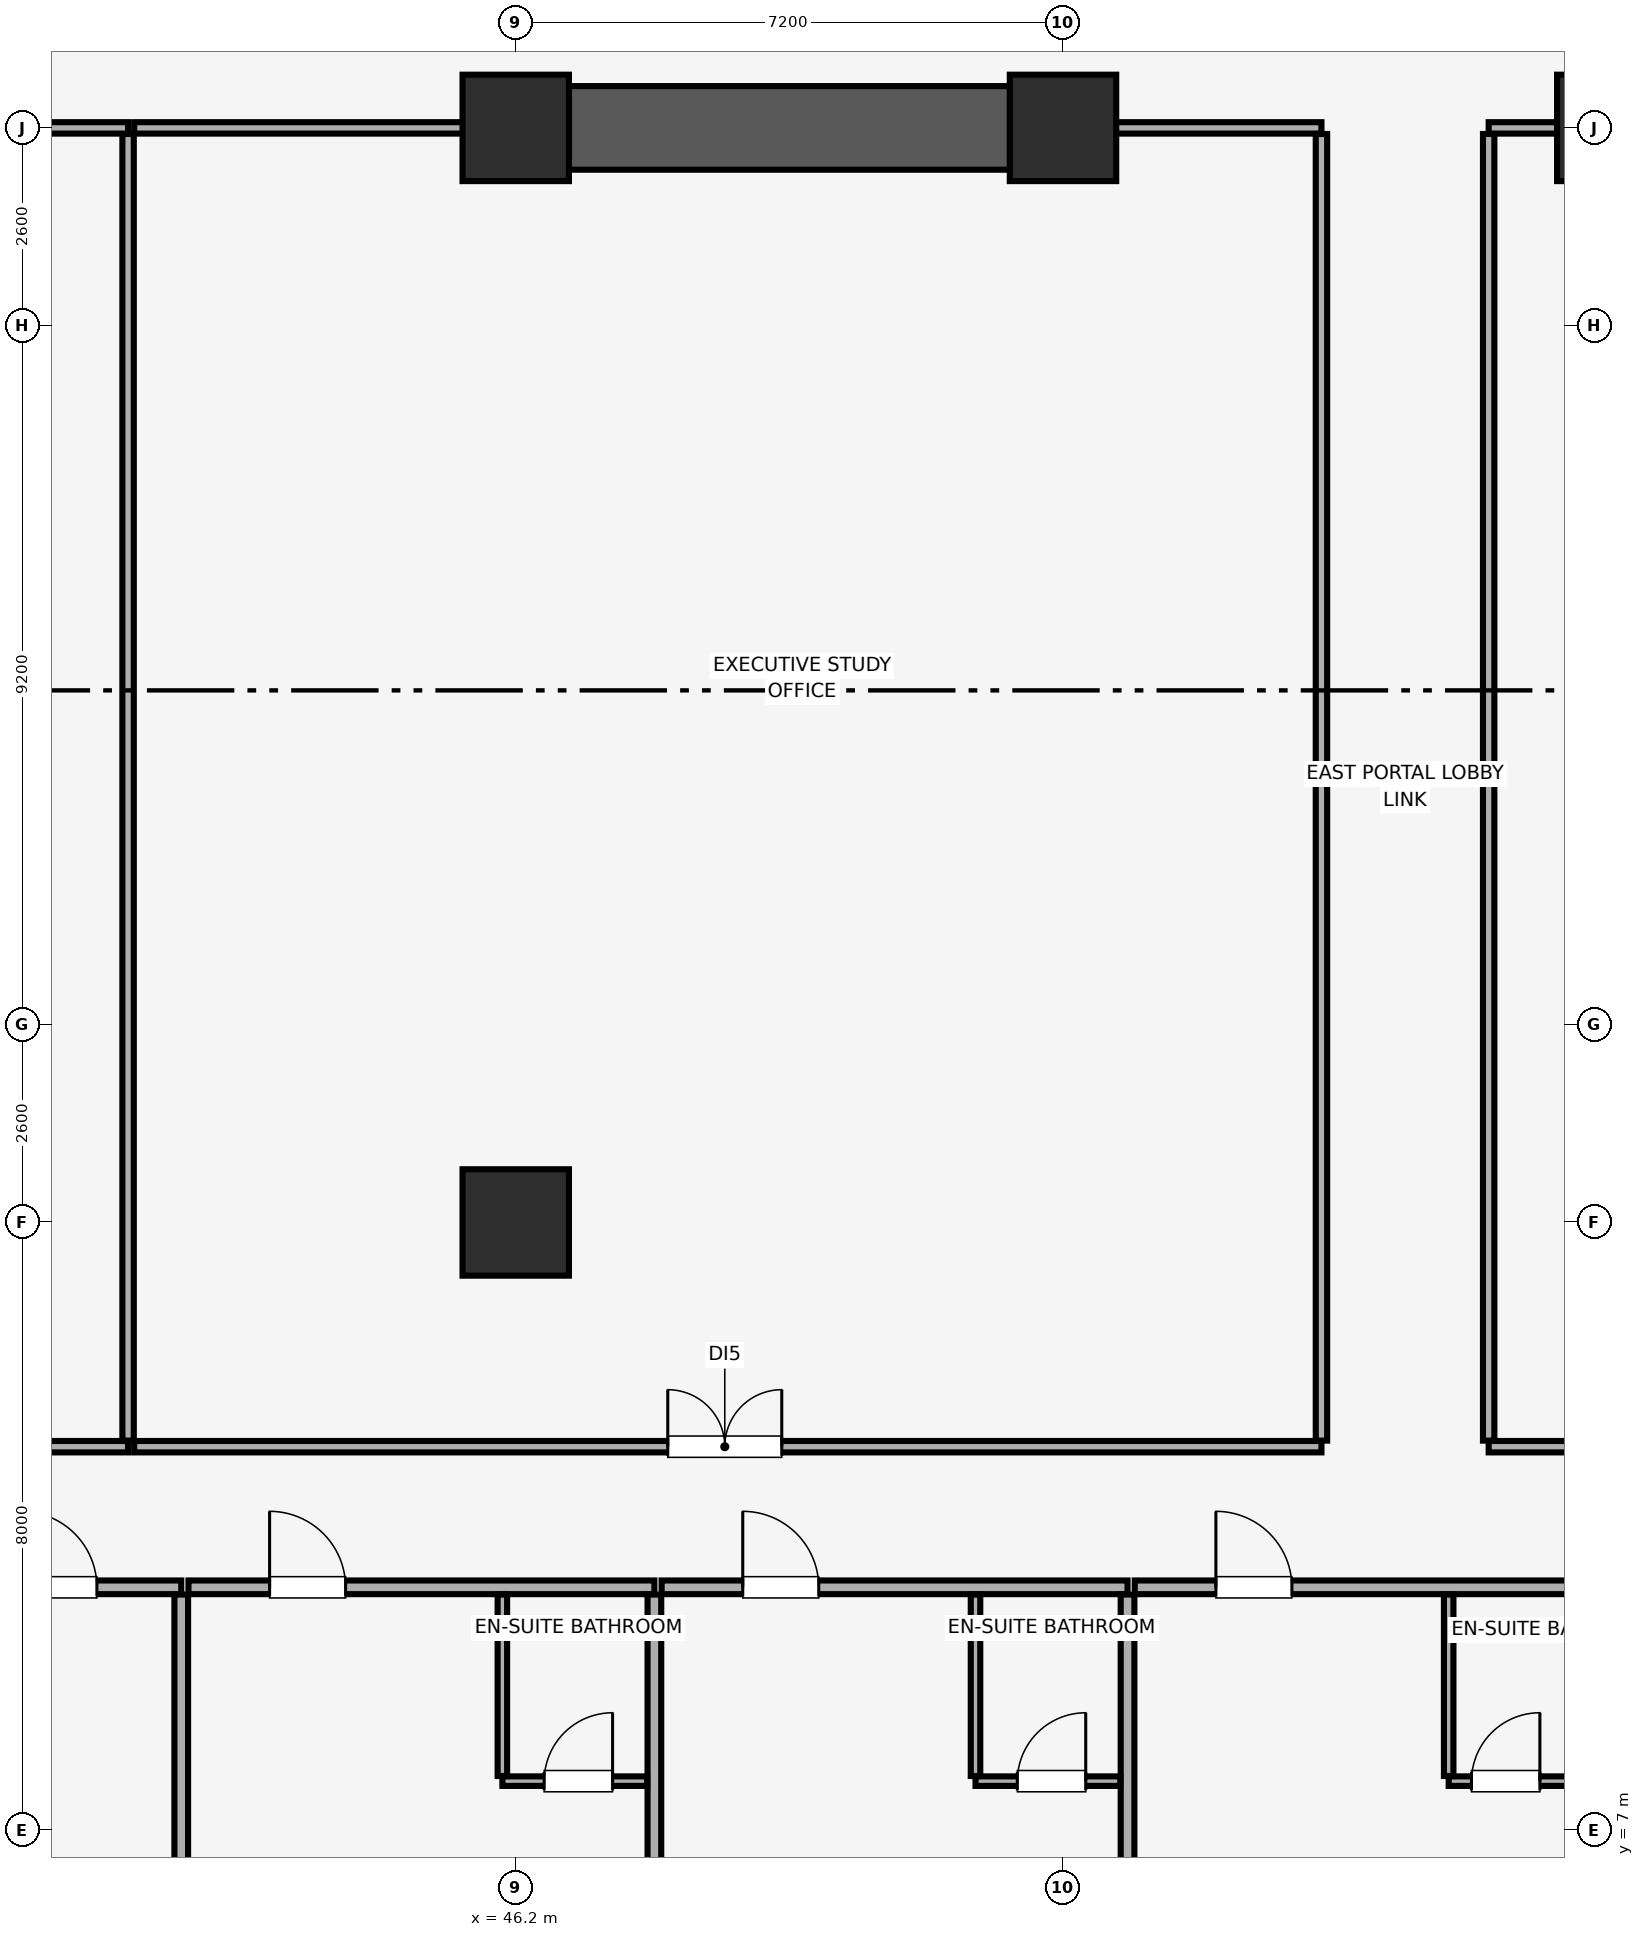
"""IFC4 building model, lengths in metres.
Left out: names, types, materials, properties, quantities, classifications, styles, units other than length and angle.
Written with IfcOpenShell. Run it as: python <this file> out.ifc"""

import sys

from ifc_helpers import new_model, si_unit, direction, frame, frame_2d, origin, origin_2d, place, context, subcontext, project, spatial, rectangle, extrude, element, fill, save


model = new_model("IFC4")
c1 = context("Model", 3, precision=1e-05, world=origin(), true_north=direction((0.0, 1.0)))
c2 = subcontext(c1, "Body", "Model", "MODEL_VIEW")
j1 = project(units=[si_unit("LENGTHUNIT", "METRE"), si_unit("PLANEANGLEUNIT", "RADIAN")], contexts=[c1])
p1 = place(None, origin())
s1 = spatial("IfcSite", under=j1, at=p1, CompositionType="ELEMENT")
p2 = place(p1, origin())
s2 = spatial("IfcBuilding", under=s1, at=p2, CompositionType="ELEMENT")
p3 = place(p2, frame((0.0, 0.0, 46.4)))
s3 = spatial("IfcBuildingStorey", under=s2, at=p3, CompositionType="ELEMENT", Elevation=46.4)
for number, where, z_axis, x_axis in (
    (1, (46.2, 15.0, 0.0), (0.0, 0.0, 1.0), (1.0, 0.0, 0.0)),
    (2, (46.2, 29.4, 0.0), (0.0, 0.0, 1.0), (1.0, 0.0, 0.0)),
    (3, (53.4, 29.4, 0.0), (0.0, 0.0, 1.0), (1.0, 0.0, 0.0)),
    (4, (60.6, 29.4, 0.0), (0.0, 0.0, 1.0), (1.0, 0.0, 0.0)),
):
    element("IfcColumn", number, at=place(p3, frame(where, z_axis=z_axis, x_axis=x_axis)), inside=s3, PredefinedType="COLUMN", context=c2, shape_type="SweptSolid", body=[
        extrude(rectangle(XDim=1.4, YDim=1.4, at=origin_2d()), origin(), (0.0, 0.0, 1.0), 3.51),
    ])
p4 = place(p3, frame((46.0, 29.4, 0.0), z_axis=(0.0, 0.0, 1.0), x_axis=(1.0, 0.0, 0.0)))
e5 = element("IfcWall", 5, at=p4, inside=s3, PredefinedType="SHEAR", context=c2, shape_type="SweptSolid", body=[
    extrude(rectangle(XDim=7.6, YDim=1.1, at=frame_2d((3.8, 0.0))), origin(), (0.0, 0.0, 1.0), 3.51),
])
p5 = place(p3, frame((35.669, 10.2, 0.0), z_axis=(0.0, 0.0, 1.0), x_axis=(1.0, 0.0, 0.0)))
e6 = element("IfcWall", 6, at=p5, inside=s3, PredefinedType="PARTITIONING", context=c2, shape_type="SweptSolid", body=[
    extrude(rectangle(XDim=6.13, YDim=0.18, at=frame_2d((3.065, 0.0))), origin(), (0.0, 0.0, 1.0), 3.51),
])
p6 = place(p5, frame((4.02, 0.0, 0.0)))
e7 = element("IfcOpeningElement", 7, at=p6, cuts=e6, PredefinedType="OPENING", context=c2, shape_type="SweptSolid", body=[
    extrude(rectangle(XDim=1.0, YDim=2.15, at=frame_2d((0.5, 1.075))), frame((0.0, 0.1, 0.0), z_axis=(0.0, -1.0, 0.0), x_axis=(1.0, 0.0, 0.0)), (0.0, 0.0, 1.0), 0.2),
])
p7 = place(p3, frame((41.799, 0.15, 0.0), z_axis=(0.0, 0.0, 1.0), x_axis=(0.0, 1.0, 0.0)))
e8 = element("IfcWall", 8, at=p7, inside=s3, PredefinedType="PARTITIONING", context=c2, shape_type="SweptSolid", body=[
    extrude(rectangle(XDim=9.955, YDim=0.18, at=frame_2d((4.978, 0.0))), origin(), (0.0, 0.0, 1.0), 2.898),
])
p8 = place(p3, frame((41.894, 10.2, 0.0), z_axis=(0.0, 0.0, 1.0), x_axis=(1.0, 0.0, 0.0)))
e9 = element("IfcWall", 9, at=p8, inside=s3, PredefinedType="PARTITIONING", context=c2, shape_type="SweptSolid", body=[
    extrude(rectangle(XDim=6.13, YDim=0.18, at=frame_2d((3.065, 0.0))), origin(), (0.0, 0.0, 1.0), 3.51),
])
p9 = place(p8, frame((1.067, 0.0, 0.0)))
e10 = element("IfcOpeningElement", 10, at=p9, cuts=e9, PredefinedType="OPENING", context=c2, shape_type="SweptSolid", body=[
    extrude(rectangle(XDim=1.0, YDim=2.15, at=frame_2d((0.5, 1.075))), frame((0.0, 0.1, 0.0), z_axis=(0.0, -1.0, 0.0), x_axis=(1.0, 0.0, 0.0)), (0.0, 0.0, 1.0), 0.2),
])
p10 = place(p3, frame((48.024, 0.15, 0.0), z_axis=(0.0, 0.0, 1.0), x_axis=(0.0, 1.0, 0.0)))
e11 = element("IfcWall", 11, at=p10, inside=s3, PredefinedType="PARTITIONING", context=c2, shape_type="SweptSolid", body=[
    extrude(rectangle(XDim=9.955, YDim=0.18, at=frame_2d((4.978, 0.0))), origin(), (0.0, 0.0, 1.0), 3.51),
])
p11 = place(p3, frame((46.024, 7.65, 0.0), z_axis=(0.0, 0.0, 1.0), x_axis=(1.0, 0.0, 0.0)))
e12 = element("IfcWall", 12, at=p11, inside=s3, PredefinedType="PARTITIONING", context=c2, shape_type="SweptSolid", body=[
    extrude(rectangle(XDim=1.905, YDim=0.125, at=frame_2d((0.953, 0.0))), origin(), (0.0, 0.0, 1.0), 3.51),
])
p12 = place(p11, frame((0.55, 0.0, 0.0)))
e13 = element("IfcOpeningElement", 13, at=p12, cuts=e12, PredefinedType="OPENING", context=c2, shape_type="SweptSolid", body=[
    extrude(rectangle(XDim=0.9, YDim=2.1, at=frame_2d((0.45, 1.05))), frame((0.0, 0.073, 0.0), z_axis=(0.0, -1.0, 0.0), x_axis=(1.0, 0.0, 0.0)), (0.0, 0.0, 1.0), 0.145),
])
p13 = place(p3, frame((46.024, 7.718, 0.0), z_axis=(0.0, 0.0, 1.0), x_axis=(0.0, 1.0, 0.0)))
e14 = element("IfcWall", 14, at=p13, inside=s3, PredefinedType="PARTITIONING", context=c2, shape_type="SweptSolid", body=[
    extrude(rectangle(XDim=2.387, YDim=0.125, at=frame_2d((1.194, 0.0))), origin(), (0.0, 0.0, 1.0), 2.898),
])
p14 = place(p3, frame((48.119, 10.2, 0.0), z_axis=(0.0, 0.0, 1.0), x_axis=(1.0, 0.0, 0.0)))
e15 = element("IfcWall", 15, at=p14, inside=s3, PredefinedType="PARTITIONING", context=c2, shape_type="SweptSolid", body=[
    extrude(rectangle(XDim=6.13, YDim=0.18, at=frame_2d((3.065, 0.0))), origin(), (0.0, 0.0, 1.0), 3.51),
])
p15 = place(p14, frame((1.067, 0.0, 0.0)))
e16 = element("IfcOpeningElement", 16, at=p15, cuts=e15, PredefinedType="OPENING", context=c2, shape_type="SweptSolid", body=[
    extrude(rectangle(XDim=1.0, YDim=2.15, at=frame_2d((0.5, 1.075))), frame((0.0, 0.1, 0.0), z_axis=(0.0, -1.0, 0.0), x_axis=(1.0, 0.0, 0.0)), (0.0, 0.0, 1.0), 0.2),
])
p16 = place(p3, frame((54.249, 0.15, 0.0), z_axis=(0.0, 0.0, 1.0), x_axis=(0.0, 1.0, 0.0)))
e17 = element("IfcWall", 17, at=p16, inside=s3, PredefinedType="PARTITIONING", context=c2, shape_type="SweptSolid", body=[
    extrude(rectangle(XDim=9.955, YDim=0.18, at=frame_2d((4.978, 0.0))), origin(), (0.0, 0.0, 1.0), 3.51),
])
p17 = place(p3, frame((52.249, 7.65, 0.0), z_axis=(0.0, 0.0, 1.0), x_axis=(1.0, 0.0, 0.0)))
e18 = element("IfcWall", 18, at=p17, inside=s3, PredefinedType="PARTITIONING", context=c2, shape_type="SweptSolid", body=[
    extrude(rectangle(XDim=1.905, YDim=0.125, at=frame_2d((0.953, 0.0))), origin(), (0.0, 0.0, 1.0), 3.51),
])
p18 = place(p17, frame((0.55, 0.0, 0.0)))
e19 = element("IfcOpeningElement", 19, at=p18, cuts=e18, PredefinedType="OPENING", context=c2, shape_type="SweptSolid", body=[
    extrude(rectangle(XDim=0.9, YDim=2.1, at=frame_2d((0.45, 1.05))), frame((0.0, 0.073, 0.0), z_axis=(0.0, -1.0, 0.0), x_axis=(1.0, 0.0, 0.0)), (0.0, 0.0, 1.0), 0.145),
])
p19 = place(p3, frame((52.249, 7.718, 0.0), z_axis=(0.0, 0.0, 1.0), x_axis=(0.0, 1.0, 0.0)))
e20 = element("IfcWall", 20, at=p19, inside=s3, PredefinedType="PARTITIONING", context=c2, shape_type="SweptSolid", body=[
    extrude(rectangle(XDim=2.387, YDim=0.125, at=frame_2d((1.194, 0.0))), origin(), (0.0, 0.0, 1.0), 3.51),
])
p20 = place(p3, frame((54.344, 10.2, 0.0), z_axis=(0.0, 0.0, 1.0), x_axis=(1.0, 0.0, 0.0)))
e21 = element("IfcWall", 21, at=p20, inside=s3, PredefinedType="PARTITIONING", context=c2, shape_type="SweptSolid", body=[
    extrude(rectangle(XDim=6.13, YDim=0.18, at=frame_2d((3.065, 0.0))), origin(), (0.0, 0.0, 1.0), 3.51),
])
p21 = place(p20, frame((1.067, 0.0, 0.0)))
e22 = element("IfcOpeningElement", 22, at=p21, cuts=e21, PredefinedType="OPENING", context=c2, shape_type="SweptSolid", body=[
    extrude(rectangle(XDim=1.0, YDim=2.15, at=frame_2d((0.5, 1.075))), frame((0.0, 0.1, 0.0), z_axis=(0.0, -1.0, 0.0), x_axis=(1.0, 0.0, 0.0)), (0.0, 0.0, 1.0), 0.2),
])
p22 = place(p3, frame((58.474, 7.65, 0.0), z_axis=(0.0, 0.0, 1.0), x_axis=(1.0, 0.0, 0.0)))
e23 = element("IfcWall", 23, at=p22, inside=s3, PredefinedType="PARTITIONING", context=c2, shape_type="SweptSolid", body=[
    extrude(rectangle(XDim=1.905, YDim=0.125, at=frame_2d((0.953, 0.0))), origin(), (0.0, 0.0, 1.0), 3.51),
])
p23 = place(p22, frame((0.3, 0.0, 0.0)))
e24 = element("IfcOpeningElement", 24, at=p23, cuts=e23, PredefinedType="OPENING", context=c2, shape_type="SweptSolid", body=[
    extrude(rectangle(XDim=0.9, YDim=2.1, at=frame_2d((0.45, 1.05))), frame((0.0, 0.073, 0.0), z_axis=(0.0, -1.0, 0.0), x_axis=(1.0, 0.0, 0.0)), (0.0, 0.0, 1.0), 0.145),
])
p24 = place(p3, frame((58.474, 7.718, 0.0), z_axis=(0.0, 0.0, 1.0), x_axis=(0.0, 1.0, 0.0)))
e25 = element("IfcWall", 25, at=p24, inside=s3, PredefinedType="PARTITIONING", context=c2, shape_type="SweptSolid", body=[
    extrude(rectangle(XDim=2.387, YDim=0.125, at=frame_2d((1.194, 0.0))), origin(), (0.0, 0.0, 1.0), 3.51),
])
p25 = place(p3, frame((27.2, 12.05, 0.0), z_axis=(0.0, 0.0, 1.0), x_axis=(1.0, 0.0, 0.0)))
e26 = element("IfcWall", 26, at=p25, inside=s3, PredefinedType="PARTITIONING", context=c2, shape_type="SweptSolid", body=[
    extrude(rectangle(XDim=13.9, YDim=0.15, at=frame_2d((6.95, 0.0))), origin(), (0.0, 0.0, 1.0), 3.51),
])
p26 = place(p25, frame((6.2, 0.0, 0.0)))
e27 = element("IfcOpeningElement", 27, at=p26, cuts=e26, PredefinedType="OPENING", context=c2, shape_type="SweptSolid", body=[
    extrude(rectangle(XDim=1.5, YDim=2.25, at=frame_2d((0.75, 1.125))), frame((0.0, 0.085, 0.0), z_axis=(0.0, -1.0, 0.0), x_axis=(1.0, 0.0, 0.0)), (0.0, 0.0, 1.0), 0.17),
])
p27 = place(p3, frame((38.01, 29.4, 0.0), z_axis=(0.0, 0.0, 1.0), x_axis=(1.0, 0.0, 0.0)))
e28 = element("IfcWall", 28, at=p27, inside=s3, PredefinedType="PARTITIONING", context=c2, shape_type="SweptSolid", body=[
    extrude(rectangle(XDim=3.09, YDim=0.15, at=frame_2d((1.545, 0.0))), origin(), (0.0, 0.0, 1.0), 2.41),
])
p28 = place(p3, frame((41.1, 12.13, 0.0), z_axis=(0.0, 0.0, 1.0), x_axis=(0.0, 1.0, 0.0)))
e29 = element("IfcWall", 29, at=p28, inside=s3, PredefinedType="PARTITIONING", context=c2, shape_type="SweptSolid", body=[
    extrude(rectangle(XDim=17.19, YDim=0.15, at=frame_2d((8.595, 0.0))), origin(), (0.0, 0.0, 1.0), 3.51),
])
p29 = place(p3, frame((41.18, 12.05, 0.0), z_axis=(0.0, 0.0, 1.0), x_axis=(1.0, 0.0, 0.0)))
e30 = element("IfcWall", 30, at=p29, inside=s3, PredefinedType="PARTITIONING", context=c2, shape_type="SweptSolid", body=[
    extrude(rectangle(XDim=15.62, YDim=0.15, at=frame_2d((7.81, 0.0))), origin(), (0.0, 0.0, 1.0), 3.51),
])
p30 = place(p29, frame((7.02, 0.0, 0.0)))
e31 = element("IfcOpeningElement", 31, at=p30, cuts=e30, PredefinedType="OPENING", context=c2, shape_type="SweptSolid", body=[
    extrude(rectangle(XDim=1.5, YDim=2.25, at=frame_2d((0.75, 1.125))), frame((0.0, 0.085, 0.0), z_axis=(0.0, -1.0, 0.0), x_axis=(1.0, 0.0, 0.0)), (0.0, 0.0, 1.0), 0.17),
])
p31 = place(p3, frame((41.18, 29.4, 0.0), z_axis=(0.0, 0.0, 1.0), x_axis=(1.0, 0.0, 0.0)))
e32 = element("IfcWall", 32, at=p31, inside=s3, PredefinedType="PARTITIONING", context=c2, shape_type="SweptSolid", body=[
    extrude(rectangle(XDim=4.81, YDim=0.15, at=frame_2d((2.405, 0.0))), origin(), (0.0, 0.0, 1.0), 2.41),
])
p32 = place(p3, frame((53.61, 29.4, 0.0), z_axis=(0.0, 0.0, 1.0), x_axis=(1.0, 0.0, 0.0)))
e33 = element("IfcWall", 33, at=p32, inside=s3, PredefinedType="PARTITIONING", context=c2, shape_type="SweptSolid", body=[
    extrude(rectangle(XDim=3.19, YDim=0.15, at=frame_2d((1.595, 0.0))), origin(), (0.0, 0.0, 1.0), 2.41),
])
p33 = place(p3, frame((56.8, 12.13, 0.0), z_axis=(0.0, 0.0, 1.0), x_axis=(0.0, 1.0, 0.0)))
e34 = element("IfcWall", 34, at=p33, inside=s3, PredefinedType="PARTITIONING", context=c2, shape_type="SweptSolid", body=[
    extrude(rectangle(XDim=17.19, YDim=0.15, at=frame_2d((8.595, 0.0))), origin(), (0.0, 0.0, 1.0), 2.898),
])
p34 = place(p3, frame((59.0, 12.05, 0.0), z_axis=(0.0, 0.0, 1.0), x_axis=(1.0, 0.0, 0.0)))
e35 = element("IfcWall", 35, at=p34, inside=s3, PredefinedType="PARTITIONING", context=c2, shape_type="SweptSolid", body=[
    extrude(rectangle(XDim=9.2, YDim=0.15, at=frame_2d((4.6, 0.0))), origin(), (0.0, 0.0, 1.0), 3.51),
])
p35 = place(p34, frame((4.1, 0.0, 0.0)))
e36 = element("IfcOpeningElement", 36, at=p35, cuts=e35, PredefinedType="OPENING", context=c2, shape_type="SweptSolid", body=[
    extrude(rectangle(XDim=1.0, YDim=2.15, at=frame_2d((0.5, 1.075))), frame((0.0, 0.085, 0.0), z_axis=(0.0, -1.0, 0.0), x_axis=(1.0, 0.0, 0.0)), (0.0, 0.0, 1.0), 0.17),
])
p36 = place(p3, frame((59.0, 29.4, 0.0), z_axis=(0.0, 0.0, 1.0), x_axis=(1.0, 0.0, 0.0)))
e37 = element("IfcWall", 37, at=p36, inside=s3, PredefinedType="PARTITIONING", context=c2, shape_type="SweptSolid", body=[
    extrude(rectangle(XDim=1.39, YDim=0.15, at=frame_2d((0.695, 0.0))), origin(), (0.0, 0.0, 1.0), 2.41),
])
p37 = place(p3, frame((59.0, 12.13, 0.0), z_axis=(0.0, 0.0, 1.0), x_axis=(0.0, 1.0, 0.0)))
e38 = element("IfcWall", 38, at=p37, inside=s3, PredefinedType="PARTITIONING", context=c2, shape_type="SweptSolid", body=[
    extrude(rectangle(XDim=17.19, YDim=0.15, at=frame_2d((8.595, 0.0))), origin(), (0.0, 0.0, 1.0), 3.51),
])
p38 = place(p6, origin())
e39 = element("IfcDoor", 39, at=p38, inside=s3, OperationType="SINGLE_SWING_LEFT", PredefinedType="DOOR", context=c2, shape_type="SweptSolid", body=[
    extrude(rectangle(XDim=1.0, YDim=2.15, at=frame_2d((0.5, 1.075))), frame((0.0, 0.025, 0.0), z_axis=(0.0, -1.0, 0.0), x_axis=(1.0, 0.0, 0.0)), (0.0, 0.0, 1.0), 0.05),
])
fill(e7, e39)
p39 = place(p9, origin())
e40 = element("IfcDoor", 40, at=p39, inside=s3, OperationType="SINGLE_SWING_LEFT", PredefinedType="DOOR", context=c2, shape_type="SweptSolid", body=[
    extrude(rectangle(XDim=1.0, YDim=2.15, at=frame_2d((0.5, 1.075))), frame((0.0, 0.025, 0.0), z_axis=(0.0, -1.0, 0.0), x_axis=(1.0, 0.0, 0.0)), (0.0, 0.0, 1.0), 0.05),
])
fill(e10, e40)
p40 = place(p12, origin())
e41 = element("IfcDoor", 41, at=p40, inside=s3, OperationType="SINGLE_SWING_RIGHT", PredefinedType="DOOR", context=c2, shape_type="SweptSolid", body=[
    extrude(rectangle(XDim=0.9, YDim=2.1, at=frame_2d((0.45, 1.05))), frame((0.0, 0.025, 0.0), z_axis=(0.0, -1.0, 0.0), x_axis=(1.0, 0.0, 0.0)), (0.0, 0.0, 1.0), 0.05),
])
fill(e13, e41)
p41 = place(p15, origin())
e42 = element("IfcDoor", 42, at=p41, inside=s3, OperationType="SINGLE_SWING_LEFT", PredefinedType="DOOR", context=c2, shape_type="SweptSolid", body=[
    extrude(rectangle(XDim=1.0, YDim=2.15, at=frame_2d((0.5, 1.075))), frame((0.0, 0.025, 0.0), z_axis=(0.0, -1.0, 0.0), x_axis=(1.0, 0.0, 0.0)), (0.0, 0.0, 1.0), 0.05),
])
fill(e16, e42)
p42 = place(p18, origin())
e43 = element("IfcDoor", 43, at=p42, inside=s3, OperationType="SINGLE_SWING_RIGHT", PredefinedType="DOOR", context=c2, shape_type="SweptSolid", body=[
    extrude(rectangle(XDim=0.9, YDim=2.1, at=frame_2d((0.45, 1.05))), frame((0.0, 0.025, 0.0), z_axis=(0.0, -1.0, 0.0), x_axis=(1.0, 0.0, 0.0)), (0.0, 0.0, 1.0), 0.05),
])
fill(e19, e43)
p43 = place(p21, origin())
e44 = element("IfcDoor", 44, at=p43, inside=s3, OperationType="SINGLE_SWING_LEFT", PredefinedType="DOOR", context=c2, shape_type="SweptSolid", body=[
    extrude(rectangle(XDim=1.0, YDim=2.15, at=frame_2d((0.5, 1.075))), frame((0.0, 0.025, 0.0), z_axis=(0.0, -1.0, 0.0), x_axis=(1.0, 0.0, 0.0)), (0.0, 0.0, 1.0), 0.05),
])
fill(e22, e44)
p44 = place(p23, origin())
e45 = element("IfcDoor", 45, at=p44, inside=s3, OperationType="SINGLE_SWING_RIGHT", PredefinedType="DOOR", context=c2, shape_type="SweptSolid", body=[
    extrude(rectangle(XDim=0.9, YDim=2.1, at=frame_2d((0.45, 1.05))), frame((0.0, 0.025, 0.0), z_axis=(0.0, -1.0, 0.0), x_axis=(1.0, 0.0, 0.0)), (0.0, 0.0, 1.0), 0.05),
])
fill(e24, e45)
p45 = place(p30, origin())
e46 = element("IfcDoor", 46, at=p45, inside=s3, OperationType="DOUBLE_DOOR_SINGLE_SWING", PredefinedType="DOOR", context=c2, shape_type="SweptSolid", body=[
    extrude(rectangle(XDim=1.5, YDim=2.25, at=frame_2d((0.75, 1.125))), frame((0.0, 0.025, 0.0), z_axis=(0.0, -1.0, 0.0), x_axis=(1.0, 0.0, 0.0)), (0.0, 0.0, 1.0), 0.05),
])
fill(e31, e46)
save(model, sys.argv[1])
